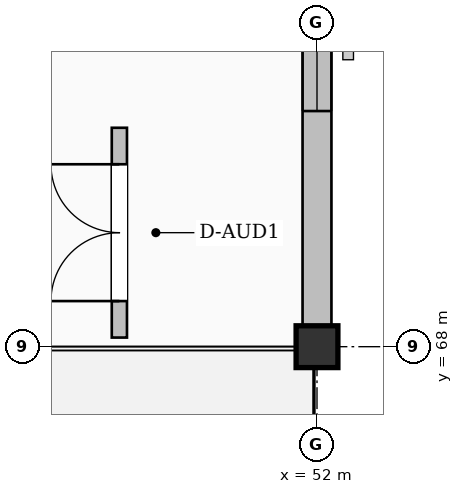
"""IFC4 building model, lengths in metres.
Left out: names, types, materials, properties, quantities, classifications, styles, units other than length and angle.
Written with IfcOpenShell. Run it as: python <this file> out.ifc"""

import sys

from ifc_helpers import new_model, si_unit, direction, frame, frame_2d, origin, origin_2d, place, context, subcontext, project, spatial, rectangle, extrude, element, fill, save


model = new_model("IFC4")
c1 = context("Model", 3, precision=1e-05, world=origin(), true_north=direction((0.0, 1.0)))
c2 = subcontext(c1, "Body", "Model", "MODEL_VIEW")
j1 = project(units=[si_unit("LENGTHUNIT", "METRE"), si_unit("PLANEANGLEUNIT", "RADIAN")], contexts=[c1])
p1 = place(None, origin())
s1 = spatial("IfcSite", under=j1, at=p1, CompositionType="ELEMENT")
p2 = place(p1, origin())
s2 = spatial("IfcBuilding", under=s1, at=p2, CompositionType="ELEMENT")
p3 = place(p2, frame((0.0, 0.0, 9.3)))
s3 = spatial("IfcBuildingStorey", under=s2, at=p3, CompositionType="ELEMENT", Elevation=9.3)
p4 = place(p3, frame((52.0, 68.0, 0.0), z_axis=(0.0, 0.0, 1.0), x_axis=(1.0, 0.0, 0.0)))
e1 = element("IfcColumn", 1, at=p4, inside=s3, PredefinedType="COLUMN", context=c2, shape_type="SweptSolid", body=[
    extrude(rectangle(XDim=0.55, YDim=0.55, at=origin_2d()), origin(), (0.0, 0.0, 1.0), 4.5),
])
p5 = place(p3, frame((52.0, 75.725, 0.0), z_axis=(0.0, 0.0, 1.0), x_axis=(0.0, -1.0, 0.0)))
e2 = element("IfcWall", 2, at=p5, inside=s3, PredefinedType="SOLIDWALL", context=c2, shape_type="SweptSolid", body=[
    extrude(rectangle(XDim=7.45, YDim=0.38, at=frame_2d((3.725, 0.0))), origin(), (0.0, 0.0, 1.0), 4.27),
])
p6 = place(p5, frame((2.825, 0.0, 0.95)))
e3 = element("IfcOpeningElement", 3, at=p6, cuts=e2, PredefinedType="OPENING", context=c2, shape_type="SweptSolid", body=[
    extrude(rectangle(XDim=1.8, YDim=1.8, at=frame_2d((0.9, 0.9))), frame((0.0, 0.2, 0.0), z_axis=(0.0, -1.0, 0.0), x_axis=(1.0, 0.0, 0.0)), (0.0, 0.0, 1.0), 0.4),
])
p7 = place(p3, frame((49.4, 68.12, 0.0), z_axis=(0.0, 0.0, 1.0), x_axis=(0.0, 1.0, 0.0)))
e4 = element("IfcWall", 4, at=p7, inside=s3, PredefinedType="PARTITIONING", context=c2, shape_type="SweptSolid", body=[
    extrude(rectangle(XDim=2.76, YDim=0.2, at=frame_2d((1.38, 0.0))), origin(), (0.0, 0.0, 1.0), 4.27),
])
p8 = place(p7, frame((0.48, 0.0, 0.0)))
e5 = element("IfcOpeningElement", 5, at=p8, cuts=e4, PredefinedType="OPENING", context=c2, shape_type="SweptSolid", body=[
    extrude(rectangle(XDim=1.8, YDim=2.35, at=frame_2d((0.9, 1.175))), frame((0.0, 0.11, 0.0), z_axis=(0.0, -1.0, 0.0), x_axis=(1.0, 0.0, 0.0)), (0.0, 0.0, 1.0), 0.22),
])
p9 = place(p6, origin())
e6 = element("IfcWindow", 6, at=p9, inside=s3, PartitioningType="DOUBLE_PANEL_VERTICAL", PredefinedType="WINDOW", context=c2, shape_type="SweptSolid", body=[
    extrude(rectangle(XDim=1.8, YDim=1.8, at=frame_2d((0.9, 0.9))), frame((0.0, 0.03, 0.0), z_axis=(0.0, -1.0, 0.0), x_axis=(1.0, 0.0, 0.0)), (0.0, 0.0, 1.0), 0.06),
])
fill(e3, e6)
p10 = place(p8, origin())
e7 = element("IfcDoor", 7, at=p10, inside=s3, OperationType="DOUBLE_DOOR_SINGLE_SWING", PredefinedType="DOOR", context=c2, shape_type="SweptSolid", body=[
    extrude(rectangle(XDim=1.8, YDim=2.35, at=frame_2d((0.9, 1.175))), frame((0.0, 0.025, 0.0), z_axis=(0.0, -1.0, 0.0), x_axis=(1.0, 0.0, 0.0)), (0.0, 0.0, 1.0), 0.05),
])
fill(e5, e7)
save(model, sys.argv[1])
